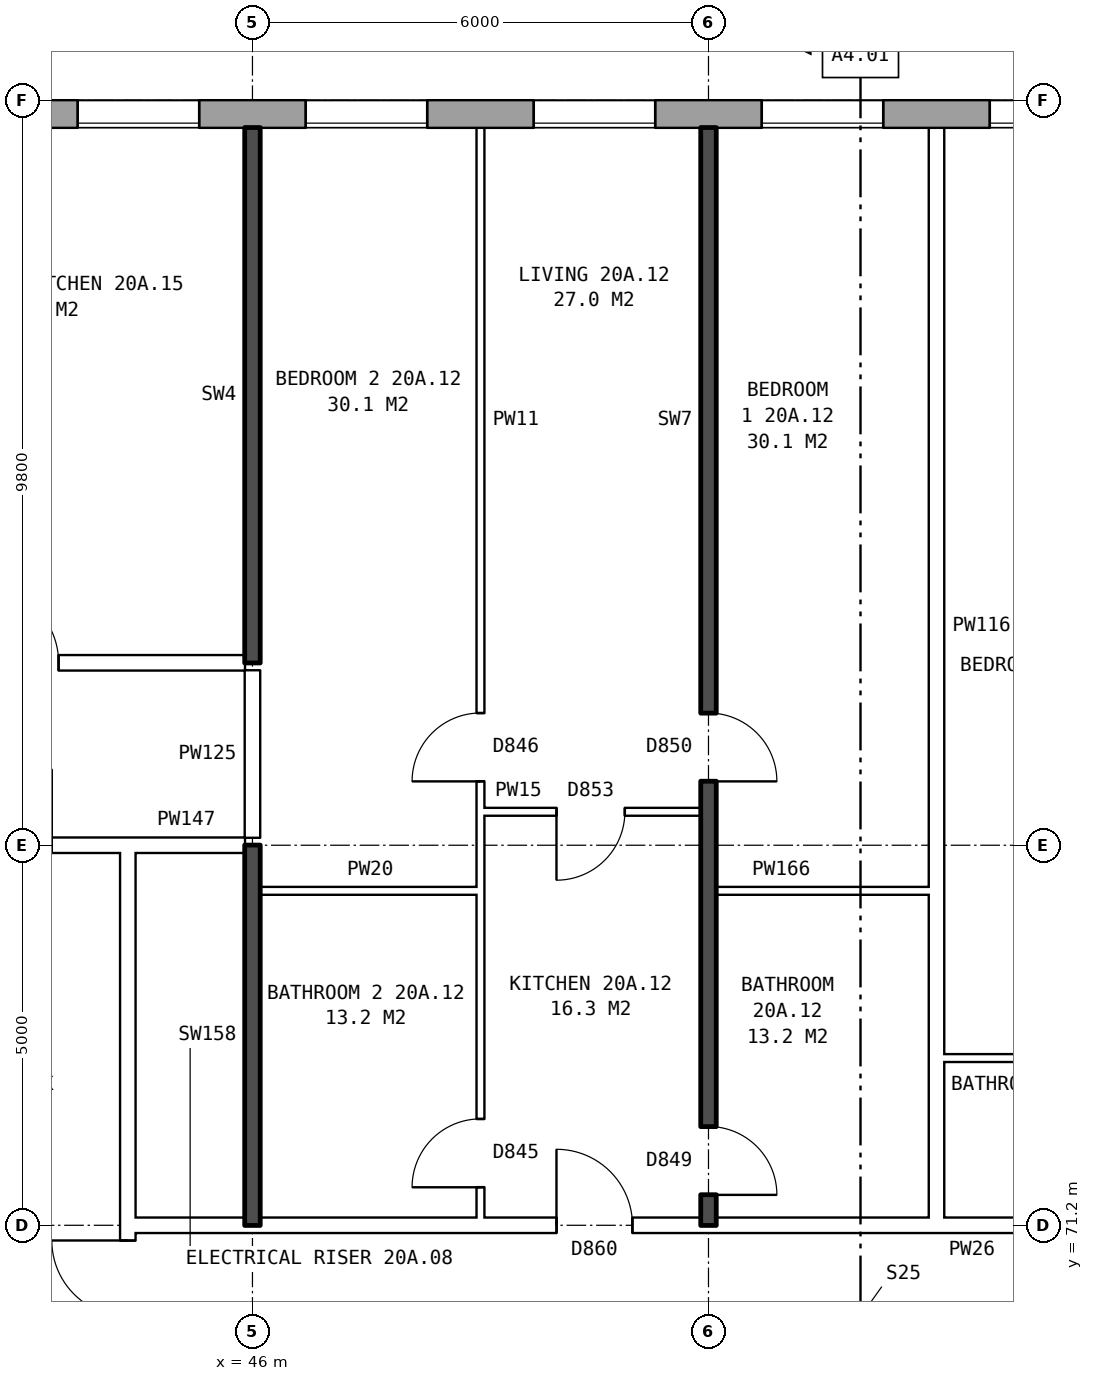
"""IFC4 building model, lengths in metres.
Left out: names, types, materials, properties, quantities, classifications, styles, units other than length and angle.
Written with IfcOpenShell. Run it as: python <this file> out.ifc"""

import sys

from ifc_helpers import new_model, si_unit, direction, frame, frame_2d, origin, place, context, subcontext, project, spatial, rectangle, extrude, element, fill, save


model = new_model("IFC4")
c1 = context("Model", 3, precision=1e-05, world=origin(), true_north=direction((0.0, 1.0)))
c2 = subcontext(c1, "Body", "Model", "MODEL_VIEW")
j1 = project(units=[si_unit("LENGTHUNIT", "METRE"), si_unit("PLANEANGLEUNIT", "RADIAN")], contexts=[c1])
p1 = place(None, origin())
s1 = spatial("IfcSite", under=j1, at=p1, CompositionType="ELEMENT")
p2 = place(p1, origin())
s2 = spatial("IfcBuilding", under=s1, at=p2, CompositionType="ELEMENT")
p3 = place(p2, frame((0.0, 0.0, 74.7)))
s3 = spatial("IfcBuildingStorey", under=s2, at=p3, CompositionType="ELEMENT", Elevation=74.7)
p4 = place(p3, frame((72.925, 85.82, 0.0), z_axis=(0.0, 0.0, 1.0), x_axis=(-1.0, 0.0, 0.0)))
e1 = element("IfcWall", 1, at=p4, inside=s3, PredefinedType="STANDARD", context=c2, shape_type="SweptSolid", body=[
    extrude(rectangle(XDim=46.601, YDim=0.36, at=frame_2d((23.3, 0.0))), origin(), (0.0, 0.0, 1.0), 2.85),
])
p5 = place(p4, frame((0.625, 0.0, 0.8)))
e2 = element("IfcOpeningElement", 2, at=p5, cuts=e1, PredefinedType="OPENING", context=c2, shape_type="SweptSolid", body=[
    extrude(rectangle(XDim=1.6, YDim=1.8, at=frame_2d((0.8, 0.9))), frame((0.0, 0.19, 0.0), z_axis=(0.0, -1.0, 0.0), x_axis=(1.0, 0.0, 0.0)), (0.0, 0.0, 1.0), 0.38),
])
p6 = place(p4, frame((3.625, 0.0, 0.8)))
e3 = element("IfcOpeningElement", 3, at=p6, cuts=e1, PredefinedType="OPENING", context=c2, shape_type="SweptSolid", body=[
    extrude(rectangle(XDim=1.6, YDim=1.8, at=frame_2d((0.8, 0.9))), frame((0.0, 0.19, 0.0), z_axis=(0.0, -1.0, 0.0), x_axis=(1.0, 0.0, 0.0)), (0.0, 0.0, 1.0), 0.38),
])
p7 = place(p4, frame((5.525, 0.0, 1.7)))
e4 = element("IfcOpeningElement", 4, at=p7, cuts=e1, PredefinedType="OPENING", context=c2, shape_type="SweptSolid", body=[
    extrude(rectangle(XDim=1.4, YDim=0.9, at=frame_2d((0.7, 0.45))), frame((0.0, 0.19, 0.0), z_axis=(0.0, -1.0, 0.0), x_axis=(1.0, 0.0, 0.0)), (0.0, 0.0, 1.0), 0.38),
])
p8 = place(p4, frame((9.625, 0.0, 0.8)))
e5 = element("IfcOpeningElement", 5, at=p8, cuts=e1, PredefinedType="OPENING", context=c2, shape_type="SweptSolid", body=[
    extrude(rectangle(XDim=1.6, YDim=1.8, at=frame_2d((0.8, 0.9))), frame((0.0, 0.19, 0.0), z_axis=(0.0, -1.0, 0.0), x_axis=(1.0, 0.0, 0.0)), (0.0, 0.0, 1.0), 0.38),
])
p9 = place(p4, frame((12.625, 0.0, 0.8)))
e6 = element("IfcOpeningElement", 6, at=p9, cuts=e1, PredefinedType="OPENING", context=c2, shape_type="SweptSolid", body=[
    extrude(rectangle(XDim=1.6, YDim=1.8, at=frame_2d((0.8, 0.9))), frame((0.0, 0.19, 0.0), z_axis=(0.0, -1.0, 0.0), x_axis=(1.0, 0.0, 0.0)), (0.0, 0.0, 1.0), 0.38),
])
p10 = place(p4, frame((15.625, 0.0, 0.8)))
e7 = element("IfcOpeningElement", 7, at=p10, cuts=e1, PredefinedType="OPENING", context=c2, shape_type="SweptSolid", body=[
    extrude(rectangle(XDim=1.6, YDim=1.8, at=frame_2d((0.8, 0.9))), frame((0.0, 0.19, 0.0), z_axis=(0.0, -1.0, 0.0), x_axis=(1.0, 0.0, 0.0)), (0.0, 0.0, 1.0), 0.38),
])
p11 = place(p4, frame((18.625, 0.0, 0.8)))
e8 = element("IfcOpeningElement", 8, at=p11, cuts=e1, PredefinedType="OPENING", context=c2, shape_type="SweptSolid", body=[
    extrude(rectangle(XDim=1.6, YDim=1.8, at=frame_2d((0.8, 0.9))), frame((0.0, 0.19, 0.0), z_axis=(0.0, -1.0, 0.0), x_axis=(1.0, 0.0, 0.0)), (0.0, 0.0, 1.0), 0.38),
])
p12 = place(p4, frame((21.625, 0.0, 0.8)))
e9 = element("IfcOpeningElement", 9, at=p12, cuts=e1, PredefinedType="OPENING", context=c2, shape_type="SweptSolid", body=[
    extrude(rectangle(XDim=1.6, YDim=1.8, at=frame_2d((0.8, 0.9))), frame((0.0, 0.19, 0.0), z_axis=(0.0, -1.0, 0.0), x_axis=(1.0, 0.0, 0.0)), (0.0, 0.0, 1.0), 0.38),
])
p13 = place(p4, frame((24.625, 0.0, 0.8)))
e10 = element("IfcOpeningElement", 10, at=p13, cuts=e1, PredefinedType="OPENING", context=c2, shape_type="SweptSolid", body=[
    extrude(rectangle(XDim=1.6, YDim=1.8, at=frame_2d((0.8, 0.9))), frame((0.0, 0.19, 0.0), z_axis=(0.0, -1.0, 0.0), x_axis=(1.0, 0.0, 0.0)), (0.0, 0.0, 1.0), 0.38),
])
p14 = place(p4, frame((27.625, 0.0, 0.8)))
e11 = element("IfcOpeningElement", 11, at=p14, cuts=e1, PredefinedType="OPENING", context=c2, shape_type="SweptSolid", body=[
    extrude(rectangle(XDim=1.6, YDim=1.8, at=frame_2d((0.8, 0.9))), frame((0.0, 0.19, 0.0), z_axis=(0.0, -1.0, 0.0), x_axis=(1.0, 0.0, 0.0)), (0.0, 0.0, 1.0), 0.38),
])
p15 = place(p4, frame((30.625, 0.0, 0.8)))
e12 = element("IfcOpeningElement", 12, at=p15, cuts=e1, PredefinedType="OPENING", context=c2, shape_type="SweptSolid", body=[
    extrude(rectangle(XDim=1.6, YDim=1.8, at=frame_2d((0.8, 0.9))), frame((0.0, 0.19, 0.0), z_axis=(0.0, -1.0, 0.0), x_axis=(1.0, 0.0, 0.0)), (0.0, 0.0, 1.0), 0.38),
])
p16 = place(p4, frame((33.625, 0.0, 0.8)))
e13 = element("IfcOpeningElement", 13, at=p16, cuts=e1, PredefinedType="OPENING", context=c2, shape_type="SweptSolid", body=[
    extrude(rectangle(XDim=1.6, YDim=1.8, at=frame_2d((0.8, 0.9))), frame((0.0, 0.19, 0.0), z_axis=(0.0, -1.0, 0.0), x_axis=(1.0, 0.0, 0.0)), (0.0, 0.0, 1.0), 0.38),
])
p17 = place(p4, frame((36.125, 0.0, 0.8)))
e14 = element("IfcOpeningElement", 14, at=p17, cuts=e1, PredefinedType="OPENING", context=c2, shape_type="SweptSolid", body=[
    extrude(rectangle(XDim=1.0, YDim=1.8, at=frame_2d((0.5, 0.9))), frame((0.0, 0.19, 0.0), z_axis=(0.0, -1.0, 0.0), x_axis=(1.0, 0.0, 0.0)), (0.0, 0.0, 1.0), 0.38),
])
p18 = place(p4, frame((39.625, 0.0, 1.7)))
e15 = element("IfcOpeningElement", 15, at=p18, cuts=e1, PredefinedType="OPENING", context=c2, shape_type="SweptSolid", body=[
    extrude(rectangle(XDim=0.8, YDim=0.9, at=frame_2d((0.4, 0.45))), frame((0.0, 0.19, 0.0), z_axis=(0.0, -1.0, 0.0), x_axis=(1.0, 0.0, 0.0)), (0.0, 0.0, 1.0), 0.38),
])
p19 = place(p4, frame((42.625, 0.0, 0.8)))
e16 = element("IfcOpeningElement", 16, at=p19, cuts=e1, PredefinedType="OPENING", context=c2, shape_type="SweptSolid", body=[
    extrude(rectangle(XDim=1.6, YDim=1.8, at=frame_2d((0.8, 0.9))), frame((0.0, 0.19, 0.0), z_axis=(0.0, -1.0, 0.0), x_axis=(1.0, 0.0, 0.0)), (0.0, 0.0, 1.0), 0.38),
])
p20 = place(p4, frame((37.425, 0.0, 0.8)))
e17 = element("IfcOpeningElement", 17, at=p20, cuts=e1, PredefinedType="OPENING", context=c2, shape_type="SweptSolid", body=[
    extrude(rectangle(XDim=0.8, YDim=0.9, at=frame_2d((0.4, 0.45))), frame((0.0, 0.19, 0.0), z_axis=(0.0, -1.0, 0.0), x_axis=(1.0, 0.0, 0.0)), (0.0, 0.0, 1.0), 0.38),
])
p21 = place(p4, frame((40.725, 0.0, 0.8)))
e18 = element("IfcOpeningElement", 18, at=p21, cuts=e1, PredefinedType="OPENING", context=c2, shape_type="SweptSolid", body=[
    extrude(rectangle(XDim=1.6, YDim=1.8, at=frame_2d((0.8, 0.9))), frame((0.0, 0.19, 0.0), z_axis=(0.0, -1.0, 0.0), x_axis=(1.0, 0.0, 0.0)), (0.0, 0.0, 1.0), 0.38),
])
p22 = place(p3, frame((44.36, 63.9, 0.0), z_axis=(0.0, 0.0, 1.0), x_axis=(0.0, 1.0, 0.0)))
e19 = element("IfcWall", 19, at=p22, inside=s3, PredefinedType="PARTITIONING", context=c2, shape_type="SweptSolid", body=[
    extrude(rectangle(XDim=12.2, YDim=0.2, at=frame_2d((6.1, 0.0))), origin(), (0.0, 0.0, 1.0), 2.85),
])
p23 = place(p22, frame((5.1, 0.0, 0.0)))
e20 = element("IfcOpeningElement", 20, at=p23, cuts=e19, PredefinedType="OPENING", context=c2, shape_type="SweptSolid", body=[
    extrude(rectangle(XDim=2.0, YDim=2.1, at=frame_2d((1.0, 1.05))), frame((0.0, 0.11, 0.0), z_axis=(0.0, -1.0, 0.0), x_axis=(1.0, 0.0, 0.0)), (0.0, 0.0, 1.0), 0.22),
])
p24 = place(p3, frame((44.36, 71.2, 0.0), z_axis=(0.0, 0.0, 1.0), x_axis=(1.0, 0.0, 0.0)))
e21 = element("IfcWall", 21, at=p24, inside=s3, PredefinedType="PARTITIONING", context=c2, shape_type="SweptSolid", body=[
    extrude(rectangle(XDim=19.28, YDim=0.2, at=frame_2d((9.64, 0.0))), origin(), (0.0, 0.0, 1.0), 2.85),
])
p25 = place(p24, frame((14.64, 0.0, 0.0)))
e22 = element("IfcOpeningElement", 22, at=p25, cuts=e21, PredefinedType="OPENING", context=c2, shape_type="SweptSolid", body=[
    extrude(rectangle(XDim=1.0, YDim=2.1, at=frame_2d((0.5, 1.05))), frame((0.0, 0.11, 0.0), z_axis=(0.0, -1.0, 0.0), x_axis=(1.0, 0.0, 0.0)), (0.0, 0.0, 1.0), 0.22),
])
p26 = place(p24, frame((5.64, 0.0, 0.0)))
e23 = element("IfcOpeningElement", 23, at=p26, cuts=e21, PredefinedType="OPENING", context=c2, shape_type="SweptSolid", body=[
    extrude(rectangle(XDim=1.0, YDim=2.1, at=frame_2d((0.5, 1.05))), frame((0.0, 0.11, 0.0), z_axis=(0.0, -1.0, 0.0), x_axis=(1.0, 0.0, 0.0)), (0.0, 0.0, 1.0), 0.22),
])
p27 = place(p3, frame((55.1, 73.4, 0.0), z_axis=(0.0, 0.0, 1.0), x_axis=(1.0, 0.0, 0.0)))
e24 = element("IfcWall", 24, at=p27, inside=s3, PredefinedType="PARTITIONING", context=c2, shape_type="SweptSolid", body=[
    extrude(rectangle(XDim=2.8, YDim=0.1, at=frame_2d((1.4, 0.0))), origin(), (0.0, 0.0, 1.0), 2.85),
])
p28 = place(p3, frame((46.1, 75.6, 0.0), z_axis=(0.0, 0.0, 1.0), x_axis=(1.0, 0.0, 0.0)))
e25 = element("IfcWall", 25, at=p28, inside=s3, PredefinedType="PARTITIONING", context=c2, shape_type="SweptSolid", body=[
    extrude(rectangle(XDim=2.9, YDim=0.1, at=frame_2d((1.45, 0.0))), origin(), (0.0, 0.0, 1.0), 2.85),
])
p29 = place(p3, frame((52.1, 75.6, 0.0), z_axis=(0.0, 0.0, 1.0), x_axis=(1.0, 0.0, 0.0)))
e26 = element("IfcWall", 26, at=p29, inside=s3, PredefinedType="PARTITIONING", context=c2, shape_type="SweptSolid", body=[
    extrude(rectangle(XDim=2.8, YDim=0.1, at=frame_2d((1.4, 0.0))), origin(), (0.0, 0.0, 1.0), 2.85),
])
p30 = place(p3, frame((41.36, 76.2, 0.0), z_axis=(0.0, 0.0, 1.0), x_axis=(1.0, 0.0, 0.0)))
e27 = element("IfcWall", 27, at=p30, inside=s3, PredefinedType="PARTITIONING", context=c2, shape_type="SweptSolid", body=[
    extrude(rectangle(XDim=3.0, YDim=0.2, at=frame_2d((1.5, 0.0))), origin(), (0.0, 0.0, 1.0), 2.85),
])
p31 = place(p30, frame((1.0, 0.0, 0.0)))
e28 = element("IfcOpeningElement", 28, at=p31, cuts=e27, PredefinedType="OPENING", context=c2, shape_type="SweptSolid", body=[
    extrude(rectangle(XDim=1.0, YDim=2.1, at=frame_2d((0.5, 1.05))), frame((0.0, 0.11, 0.0), z_axis=(0.0, -1.0, 0.0), x_axis=(1.0, 0.0, 0.0)), (0.0, 0.0, 1.0), 0.22),
])
p32 = place(p3, frame((44.36, 76.2, 0.0), z_axis=(0.0, 0.0, 1.0), x_axis=(1.0, 0.0, 0.0)))
e29 = element("IfcWall", 29, at=p32, inside=s3, PredefinedType="PARTITIONING", context=c2, shape_type="SweptSolid", body=[
    extrude(rectangle(XDim=1.54, YDim=0.2, at=frame_2d((0.77, 0.0))), origin(), (0.0, 0.0, 1.0), 2.85),
])
p33 = place(p3, frame((49.0, 76.64, 0.0), z_axis=(0.0, 0.0, 1.0), x_axis=(1.0, 0.0, 0.0)))
e30 = element("IfcWall", 30, at=p33, inside=s3, PredefinedType="PARTITIONING", context=c2, shape_type="SweptSolid", body=[
    extrude(rectangle(XDim=2.9, YDim=0.1, at=frame_2d((1.45, 0.0))), origin(), (0.0, 0.0, 1.0), 2.85),
])
p34 = place(p33, frame((1.0, 0.0, 0.0)))
e31 = element("IfcOpeningElement", 31, at=p34, cuts=e30, PredefinedType="OPENING", context=c2, shape_type="SweptSolid", body=[
    extrude(rectangle(XDim=0.9, YDim=2.1, at=frame_2d((0.45, 1.05))), frame((0.0, 0.06, 0.0), z_axis=(0.0, -1.0, 0.0), x_axis=(1.0, 0.0, 0.0)), (0.0, 0.0, 1.0), 0.12),
])
p35 = place(p3, frame((23.61, 78.6, 0.0), z_axis=(0.0, 0.0, 1.0), x_axis=(1.0, 0.0, 0.0)))
e32 = element("IfcWall", 32, at=p35, inside=s3, PredefinedType="PARTITIONING", context=c2, shape_type="SweptSolid", body=[
    extrude(rectangle(XDim=22.29, YDim=0.2, at=frame_2d((11.145, 0.0))), origin(), (0.0, 0.0, 1.0), 2.85),
])
p36 = place(p35, frame((18.84, 0.0, 0.0)))
e33 = element("IfcOpeningElement", 33, at=p36, cuts=e32, PredefinedType="OPENING", context=c2, shape_type="SweptSolid", body=[
    extrude(rectangle(XDim=1.0, YDim=2.1, at=frame_2d((0.5, 1.05))), frame((0.0, 0.11, 0.0), z_axis=(0.0, -1.0, 0.0), x_axis=(1.0, 0.0, 0.0)), (0.0, 0.0, 1.0), 0.22),
])
p37 = place(p35, frame((6.89, 0.0, 0.0)))
e34 = element("IfcOpeningElement", 34, at=p37, cuts=e32, PredefinedType="OPENING", context=c2, shape_type="SweptSolid", body=[
    extrude(rectangle(XDim=1.0, YDim=2.1, at=frame_2d((0.5, 1.05))), frame((0.0, 0.11, 0.0), z_axis=(0.0, -1.0, 0.0), x_axis=(1.0, 0.0, 0.0)), (0.0, 0.0, 1.0), 0.22),
])
p38 = place(p3, frame((46.0, 71.2, 0.0), z_axis=(0.0, 0.0, 1.0), x_axis=(0.0, 1.0, 0.0)))
e35 = element("IfcWall", 35, at=p38, inside=s3, PredefinedType="SOLIDWALL", context=c2, shape_type="SweptSolid", body=[
    extrude(rectangle(XDim=5.0, YDim=0.2, at=frame_2d((2.5, 0.0))), origin(), (0.0, 0.0, 1.0), 2.85),
])
p39 = place(p3, frame((46.0, 76.3, 0.0), z_axis=(0.0, 0.0, 1.0), x_axis=(0.0, 1.0, 0.0)))
e36 = element("IfcWall", 36, at=p39, inside=s3, PredefinedType="PARTITIONING", context=c2, shape_type="SweptSolid", body=[
    extrude(rectangle(XDim=2.2, YDim=0.2, at=frame_2d((1.1, 0.0))), origin(), (0.0, 0.0, 1.0), 2.85),
])
p40 = place(p3, frame((46.0, 78.6, 0.0), z_axis=(0.0, 0.0, 1.0), x_axis=(0.0, 1.0, 0.0)))
e37 = element("IfcWall", 37, at=p40, inside=s3, PredefinedType="SOLIDWALL", context=c2, shape_type="SweptSolid", body=[
    extrude(rectangle(XDim=7.04, YDim=0.2, at=frame_2d((3.52, 0.0))), origin(), (0.0, 0.0, 1.0), 2.85),
])
p41 = place(p3, frame((49.0, 71.3, 0.0), z_axis=(0.0, 0.0, 1.0), x_axis=(0.0, 1.0, 0.0)))
e38 = element("IfcWall", 38, at=p41, inside=s3, PredefinedType="PARTITIONING", context=c2, shape_type="SweptSolid", body=[
    extrude(rectangle(XDim=14.34, YDim=0.1, at=frame_2d((7.17, 0.0))), origin(), (0.0, 0.0, 1.0), 2.85),
])
p42 = place(p41, frame((5.74, 0.0, 0.0)))
e39 = element("IfcOpeningElement", 39, at=p42, cuts=e38, PredefinedType="OPENING", context=c2, shape_type="SweptSolid", body=[
    extrude(rectangle(XDim=0.9, YDim=2.1, at=frame_2d((0.45, 1.05))), frame((0.0, 0.06, 0.0), z_axis=(0.0, -1.0, 0.0), x_axis=(1.0, 0.0, 0.0)), (0.0, 0.0, 1.0), 0.12),
])
p43 = place(p41, frame((0.4, 0.0, 0.0)))
e40 = element("IfcOpeningElement", 40, at=p43, cuts=e38, PredefinedType="OPENING", context=c2, shape_type="SweptSolid", body=[
    extrude(rectangle(XDim=0.9, YDim=2.1, at=frame_2d((0.45, 1.05))), frame((0.0, 0.06, 0.0), z_axis=(0.0, -1.0, 0.0), x_axis=(1.0, 0.0, 0.0)), (0.0, 0.0, 1.0), 0.12),
])
p44 = place(p3, frame((52.0, 71.2, 0.0), z_axis=(0.0, 0.0, 1.0), x_axis=(0.0, 1.0, 0.0)))
e41 = element("IfcWall", 41, at=p44, inside=s3, PredefinedType="SOLIDWALL", context=c2, shape_type="SweptSolid", body=[
    extrude(rectangle(XDim=14.44, YDim=0.2, at=frame_2d((7.22, 0.0))), origin(), (0.0, 0.0, 1.0), 2.85),
])
p45 = place(p44, frame((5.84, 0.0, 0.0)))
e42 = element("IfcOpeningElement", 42, at=p45, cuts=e41, PredefinedType="OPENING", context=c2, shape_type="SweptSolid", body=[
    extrude(rectangle(XDim=0.9, YDim=2.1, at=frame_2d((0.45, 1.05))), frame((0.0, 0.11, 0.0), z_axis=(0.0, -1.0, 0.0), x_axis=(1.0, 0.0, 0.0)), (0.0, 0.0, 1.0), 0.22),
])
p46 = place(p44, frame((0.4, 0.0, 0.0)))
e43 = element("IfcOpeningElement", 43, at=p46, cuts=e41, PredefinedType="OPENING", context=c2, shape_type="SweptSolid", body=[
    extrude(rectangle(XDim=0.9, YDim=2.1, at=frame_2d((0.45, 1.05))), frame((0.0, 0.11, 0.0), z_axis=(0.0, -1.0, 0.0), x_axis=(1.0, 0.0, 0.0)), (0.0, 0.0, 1.0), 0.22),
])
p47 = place(p3, frame((55.0, 71.3, 0.0), z_axis=(0.0, 0.0, 1.0), x_axis=(0.0, 1.0, 0.0)))
e44 = element("IfcWall", 44, at=p47, inside=s3, PredefinedType="PARTITIONING", context=c2, shape_type="SweptSolid", body=[
    extrude(rectangle(XDim=14.34, YDim=0.2, at=frame_2d((7.17, 0.0))), origin(), (0.0, 0.0, 1.0), 2.85),
])
p48 = place(p10, origin())
e45 = element("IfcWindow", 45, at=p48, inside=s3, PartitioningType="SINGLE_PANEL", PredefinedType="WINDOW", context=c2, shape_type="SweptSolid", body=[
    extrude(rectangle(XDim=1.6, YDim=1.8, at=frame_2d((0.8, 0.9))), frame((0.0, 0.15, 0.0), z_axis=(0.0, -1.0, 0.0), x_axis=(1.0, 0.0, 0.0)), (0.0, 0.0, 1.0), 0.06),
])
fill(e7, e45)
p49 = place(p11, origin())
e46 = element("IfcWindow", 46, at=p49, inside=s3, PartitioningType="SINGLE_PANEL", PredefinedType="WINDOW", context=c2, shape_type="SweptSolid", body=[
    extrude(rectangle(XDim=1.6, YDim=1.8, at=frame_2d((0.8, 0.9))), frame((0.0, 0.15, 0.0), z_axis=(0.0, -1.0, 0.0), x_axis=(1.0, 0.0, 0.0)), (0.0, 0.0, 1.0), 0.06),
])
fill(e8, e46)
p50 = place(p12, origin())
e47 = element("IfcWindow", 47, at=p50, inside=s3, PartitioningType="SINGLE_PANEL", PredefinedType="WINDOW", context=c2, shape_type="SweptSolid", body=[
    extrude(rectangle(XDim=1.6, YDim=1.8, at=frame_2d((0.8, 0.9))), frame((0.0, 0.15, 0.0), z_axis=(0.0, -1.0, 0.0), x_axis=(1.0, 0.0, 0.0)), (0.0, 0.0, 1.0), 0.06),
])
fill(e9, e47)
p51 = place(p13, origin())
e48 = element("IfcWindow", 48, at=p51, inside=s3, PartitioningType="SINGLE_PANEL", PredefinedType="WINDOW", context=c2, shape_type="SweptSolid", body=[
    extrude(rectangle(XDim=1.6, YDim=1.8, at=frame_2d((0.8, 0.9))), frame((0.0, 0.15, 0.0), z_axis=(0.0, -1.0, 0.0), x_axis=(1.0, 0.0, 0.0)), (0.0, 0.0, 1.0), 0.06),
])
fill(e10, e48)
p52 = place(p14, origin())
e49 = element("IfcWindow", 49, at=p52, inside=s3, PartitioningType="SINGLE_PANEL", PredefinedType="WINDOW", context=c2, shape_type="SweptSolid", body=[
    extrude(rectangle(XDim=1.6, YDim=1.8, at=frame_2d((0.8, 0.9))), frame((0.0, 0.15, 0.0), z_axis=(0.0, -1.0, 0.0), x_axis=(1.0, 0.0, 0.0)), (0.0, 0.0, 1.0), 0.06),
])
fill(e11, e49)
p53 = place(p23, origin())
e50 = element("IfcDoor", 50, at=p53, inside=s3, OperationType="DOUBLE_DOOR_SINGLE_SWING", PredefinedType="DOOR", context=c2, shape_type="SweptSolid", body=[
    extrude(rectangle(XDim=2.0, YDim=2.1, at=frame_2d((1.0, 1.05))), frame((0.0, 0.025, 0.0), z_axis=(0.0, -1.0, 0.0), x_axis=(1.0, 0.0, 0.0)), (0.0, 0.0, 1.0), 0.05),
])
fill(e20, e50)
p54 = place(p45, frame((0.9, 0.0, 0.0), z_axis=(0.0, 0.0, 1.0), x_axis=(-1.0, 0.0, 0.0)))
e51 = element("IfcDoor", 51, at=p54, inside=s3, OperationType="SINGLE_SWING_RIGHT", PredefinedType="DOOR", context=c2, shape_type="SweptSolid", body=[
    extrude(rectangle(XDim=0.9, YDim=2.1, at=frame_2d((0.45, 1.05))), frame((0.0, 0.025, 0.0), z_axis=(0.0, -1.0, 0.0), x_axis=(1.0, 0.0, 0.0)), (0.0, 0.0, 1.0), 0.05),
])
fill(e42, e51)
p55 = place(p42, origin())
e52 = element("IfcDoor", 52, at=p55, inside=s3, OperationType="SINGLE_SWING_LEFT", PredefinedType="DOOR", context=c2, shape_type="SweptSolid", body=[
    extrude(rectangle(XDim=0.9, YDim=2.1, at=frame_2d((0.45, 1.05))), frame((0.0, 0.025, 0.0), z_axis=(0.0, -1.0, 0.0), x_axis=(1.0, 0.0, 0.0)), (0.0, 0.0, 1.0), 0.05),
])
fill(e39, e52)
p56 = place(p26, origin())
e53 = element("IfcDoor", 53, at=p56, inside=s3, OperationType="SINGLE_SWING_LEFT", PredefinedType="DOOR", context=c2, shape_type="SweptSolid", body=[
    extrude(rectangle(XDim=1.0, YDim=2.1, at=frame_2d((0.5, 1.05))), frame((0.0, 0.025, 0.0), z_axis=(0.0, -1.0, 0.0), x_axis=(1.0, 0.0, 0.0)), (0.0, 0.0, 1.0), 0.05),
])
fill(e23, e53)
p57 = place(p34, frame((0.9, 0.0, 0.0), z_axis=(0.0, 0.0, 1.0), x_axis=(-1.0, 0.0, 0.0)))
e54 = element("IfcDoor", 54, at=p57, inside=s3, OperationType="SINGLE_SWING_RIGHT", PredefinedType="DOOR", context=c2, shape_type="SweptSolid", body=[
    extrude(rectangle(XDim=0.9, YDim=2.1, at=frame_2d((0.45, 1.05))), frame((0.0, 0.025, 0.0), z_axis=(0.0, -1.0, 0.0), x_axis=(1.0, 0.0, 0.0)), (0.0, 0.0, 1.0), 0.05),
])
fill(e31, e54)
p58 = place(p46, frame((0.9, 0.0, 0.0), z_axis=(0.0, 0.0, 1.0), x_axis=(-1.0, 0.0, 0.0)))
e55 = element("IfcDoor", 55, at=p58, inside=s3, OperationType="SINGLE_SWING_RIGHT", PredefinedType="DOOR", context=c2, shape_type="SweptSolid", body=[
    extrude(rectangle(XDim=0.9, YDim=2.1, at=frame_2d((0.45, 1.05))), frame((0.0, 0.025, 0.0), z_axis=(0.0, -1.0, 0.0), x_axis=(1.0, 0.0, 0.0)), (0.0, 0.0, 1.0), 0.05),
])
fill(e43, e55)
p59 = place(p43, origin())
e56 = element("IfcDoor", 56, at=p59, inside=s3, OperationType="SINGLE_SWING_LEFT", PredefinedType="DOOR", context=c2, shape_type="SweptSolid", body=[
    extrude(rectangle(XDim=0.9, YDim=2.1, at=frame_2d((0.45, 1.05))), frame((0.0, 0.025, 0.0), z_axis=(0.0, -1.0, 0.0), x_axis=(1.0, 0.0, 0.0)), (0.0, 0.0, 1.0), 0.05),
])
fill(e40, e56)
p60 = place(p36, origin())
e57 = element("IfcDoor", 57, at=p60, inside=s3, OperationType="SINGLE_SWING_LEFT", PredefinedType="DOOR", context=c2, shape_type="SweptSolid", body=[
    extrude(rectangle(XDim=1.0, YDim=2.1, at=frame_2d((0.5, 1.05))), frame((0.0, 0.025, 0.0), z_axis=(0.0, -1.0, 0.0), x_axis=(1.0, 0.0, 0.0)), (0.0, 0.0, 1.0), 0.05),
])
fill(e33, e57)
save(model, sys.argv[1])
